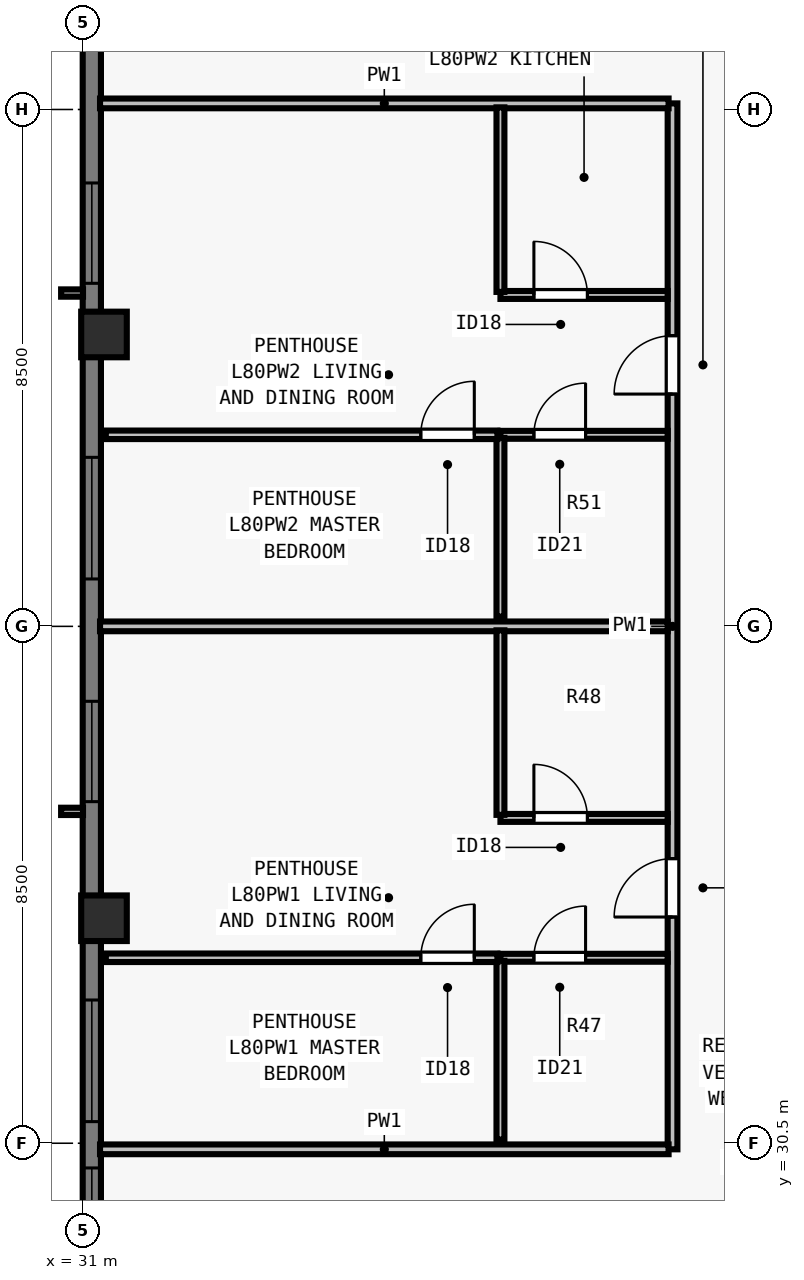
"""IFC4 building model, lengths in metres.
Left out: names, types, materials, properties, quantities, classifications, styles, units other than length and angle.
Written with IfcOpenShell. Run it as: python <this file> out.ifc"""

import sys

from ifc_helpers import new_model, si_unit, direction, frame, frame_2d, origin, origin_2d, place, context, subcontext, project, spatial, rectangle, extrude, element, fill, save


model = new_model("IFC4")
c1 = context("Model", 3, precision=1e-05, world=origin(), true_north=direction((0.0, 1.0)))
c2 = subcontext(c1, "Body", "Model", "MODEL_VIEW")
j1 = project(units=[si_unit("LENGTHUNIT", "METRE"), si_unit("PLANEANGLEUNIT", "RADIAN")], contexts=[c1])
p1 = place(None, origin())
s1 = spatial("IfcSite", under=j1, at=p1, CompositionType="ELEMENT")
p2 = place(p1, origin())
s2 = spatial("IfcBuilding", under=s1, at=p2, CompositionType="ELEMENT")
p3 = place(p2, frame((0.0, 0.0, 291.0)))
s3 = spatial("IfcBuildingStorey", under=s2, at=p3, CompositionType="ELEMENT", Elevation=291.0)
for number, where, z_axis, x_axis in (
    (1, (31.35, 43.8, 0.0), (0.0, 0.0, 1.0), (0.0, 1.0, 0.0)),
    (2, (31.35, 34.2, 0.0), (0.0, 0.0, 1.0), (0.0, 1.0, 0.0)),
):
    element("IfcColumn", number, at=place(p3, frame(where, z_axis=z_axis, x_axis=x_axis)), inside=s3, PredefinedType="COLUMN", context=c2, shape_type="SweptSolid", body=[
        extrude(rectangle(XDim=0.75, YDim=0.75, at=origin_2d()), origin(), (0.0, 0.0, 1.0), 3.5),
    ])
p4 = place(p3, frame((31.15, 23.5, 0.0), z_axis=(0.0, 0.0, 1.0), x_axis=(0.0, 1.0, 0.0)))
e3 = element("IfcWall", 3, at=p4, inside=s3, PredefinedType="SOLIDWALL", context=c2, shape_type="SweptSolid", body=[
    extrude(rectangle(XDim=30.722, YDim=0.3, at=frame_2d((15.361, 0.0))), origin(), (0.0, 0.0, 1.0), 3.29),
])
p5 = place(p4, frame((4.944, 0.0, 0.8)))
e4 = element("IfcOpeningElement", 4, at=p5, cuts=e3, PredefinedType="OPENING", context=c2, shape_type="SweptSolid", body=[
    extrude(rectangle(XDim=1.65, YDim=1.758, at=frame_2d((0.825, 0.879))), frame((0.0, 0.16, 0.0), z_axis=(0.0, -1.0, 0.0), x_axis=(1.0, 0.0, 0.0)), (0.0, 0.0, 1.0), 0.32),
])
p6 = place(p4, frame((7.355, 0.0, 0.8)))
e5 = element("IfcOpeningElement", 5, at=p6, cuts=e3, PredefinedType="OPENING", context=c2, shape_type="SweptSolid", body=[
    extrude(rectangle(XDim=2.0, YDim=1.758, at=frame_2d((1.0, 0.879))), frame((0.0, 0.16, 0.0), z_axis=(0.0, -1.0, 0.0), x_axis=(1.0, 0.0, 0.0)), (0.0, 0.0, 1.0), 0.32),
])
p7 = place(p4, frame((12.617, 0.0, 0.8)))
e6 = element("IfcOpeningElement", 6, at=p7, cuts=e3, PredefinedType="OPENING", context=c2, shape_type="SweptSolid", body=[
    extrude(rectangle(XDim=1.65, YDim=1.758, at=frame_2d((0.825, 0.879))), frame((0.0, 0.16, 0.0), z_axis=(0.0, -1.0, 0.0), x_axis=(1.0, 0.0, 0.0)), (0.0, 0.0, 1.0), 0.32),
])
p8 = place(p4, frame((16.28, 0.0, 0.8)))
e7 = element("IfcOpeningElement", 7, at=p8, cuts=e3, PredefinedType="OPENING", context=c2, shape_type="SweptSolid", body=[
    extrude(rectangle(XDim=2.0, YDim=1.758, at=frame_2d((1.0, 0.879))), frame((0.0, 0.16, 0.0), z_axis=(0.0, -1.0, 0.0), x_axis=(1.0, 0.0, 0.0)), (0.0, 0.0, 1.0), 0.32),
])
p9 = place(p4, frame((21.142, 0.0, 0.8)))
e8 = element("IfcOpeningElement", 8, at=p9, cuts=e3, PredefinedType="OPENING", context=c2, shape_type="SweptSolid", body=[
    extrude(rectangle(XDim=1.65, YDim=1.758, at=frame_2d((0.825, 0.879))), frame((0.0, 0.16, 0.0), z_axis=(0.0, -1.0, 0.0), x_axis=(1.0, 0.0, 0.0)), (0.0, 0.0, 1.0), 0.32),
])
p10 = place(p4, frame((27.11, 0.0, 0.8)))
e9 = element("IfcOpeningElement", 9, at=p10, cuts=e3, PredefinedType="OPENING", context=c2, shape_type="SweptSolid", body=[
    extrude(rectangle(XDim=0.9, YDim=1.75, at=frame_2d((0.45, 0.875))), frame((0.0, 0.16, 0.0), z_axis=(0.0, -1.0, 0.0), x_axis=(1.0, 0.0, 0.0)), (0.0, 0.0, 1.0), 0.32),
])
p11 = place(p3, frame((40.7, 30.4, 0.0), z_axis=(0.0, 0.0, 1.0), x_axis=(0.0, 1.0, 0.0)))
e10 = element("IfcWall", 10, at=p11, inside=s3, PredefinedType="PARTITIONING", context=c2, shape_type="SweptSolid", body=[
    extrude(rectangle(XDim=17.2, YDim=0.16, at=frame_2d((8.6, 0.0))), origin(), (0.0, 0.0, 1.0), 3.009),
])
p12 = place(p11, frame((3.82, 0.0, 0.0)))
e11 = element("IfcOpeningElement", 11, at=p12, cuts=e10, PredefinedType="OPENING", context=c2, shape_type="SweptSolid", body=[
    extrude(rectangle(XDim=0.96, YDim=2.18, at=frame_2d((0.48, 1.09))), frame((0.0, 0.09, 0.0), z_axis=(0.0, -1.0, 0.0), x_axis=(1.0, 0.0, 0.0)), (0.0, 0.0, 1.0), 0.18),
])
p13 = place(p11, frame((12.42, 0.0, 0.0)))
e12 = element("IfcOpeningElement", 12, at=p13, cuts=e10, PredefinedType="OPENING", context=c2, shape_type="SweptSolid", body=[
    extrude(rectangle(XDim=0.96, YDim=2.18, at=frame_2d((0.48, 1.09))), frame((0.0, 0.09, 0.0), z_axis=(0.0, -1.0, 0.0), x_axis=(1.0, 0.0, 0.0)), (0.0, 0.0, 1.0), 0.18),
])
for number, where, z_axis, x_axis in (
    (13, (31.285, 30.4, 0.0), (0.0, 0.0, 1.0), (1.0, 0.0, 0.0)),
    (14, (31.285, 47.6, 0.0), (0.0, 0.0, 1.0), (1.0, 0.0, 0.0)),
):
    element("IfcWall", number, at=place(p3, frame(where, z_axis=z_axis, x_axis=x_axis)), inside=s3, PredefinedType="PARTITIONING", context=c2, shape_type="SweptSolid", body=[
        extrude(rectangle(XDim=9.35, YDim=0.16, at=frame_2d((4.675, 0.0))), origin(), (0.0, 0.0, 1.0), 3.29),
    ])
p14 = place(p3, frame((31.285, 39.0, 0.0), z_axis=(0.0, 0.0, 1.0), x_axis=(1.0, 0.0, 0.0)))
e15 = element("IfcWall", 15, at=p14, inside=s3, PredefinedType="PARTITIONING", context=c2, shape_type="SweptSolid", body=[
    extrude(rectangle(XDim=9.335, YDim=0.16, at=frame_2d((4.667, 0.0))), origin(), (0.0, 0.0, 1.0), 3.29),
])
p15 = place(p3, frame((37.87, 33.55, 0.0), z_axis=(0.0, 0.0, 1.0), x_axis=(1.0, 0.0, 0.0)))
e16 = element("IfcWall", 16, at=p15, inside=s3, PredefinedType="PLUMBINGWALL", context=c2, shape_type="SweptSolid", body=[
    extrude(rectangle(XDim=2.75, YDim=0.13, at=frame_2d((1.375, 0.0))), origin(), (0.0, 0.0, 1.0), 3.29),
])
p16 = place(p15, frame((0.55, 0.0, 0.0)))
e17 = element("IfcOpeningElement", 17, at=p16, cuts=e16, PredefinedType="OPENING", context=c2, shape_type="SweptSolid", body=[
    extrude(rectangle(XDim=0.85, YDim=2.08, at=frame_2d((0.425, 1.04))), frame((0.0, 0.075, 0.0), z_axis=(0.0, -1.0, 0.0), x_axis=(1.0, 0.0, 0.0)), (0.0, 0.0, 1.0), 0.15),
])
p17 = place(p3, frame((37.87, 30.56, 0.0), z_axis=(0.0, 0.0, 1.0), x_axis=(0.0, 1.0, 0.0)))
e18 = element("IfcWall", 18, at=p17, inside=s3, PredefinedType="PLUMBINGWALL", context=c2, shape_type="SweptSolid", body=[
    extrude(rectangle(XDim=2.94, YDim=0.13, at=frame_2d((1.47, 0.0))), origin(), (0.0, 0.0, 1.0), 3.29),
])
p18 = place(p3, frame((37.87, 35.85, 0.0), z_axis=(0.0, 0.0, 1.0), x_axis=(1.0, 0.0, 0.0)))
e19 = element("IfcWall", 19, at=p18, inside=s3, PredefinedType="PLUMBINGWALL", context=c2, shape_type="SweptSolid", body=[
    extrude(rectangle(XDim=2.75, YDim=0.13, at=frame_2d((1.375, 0.0))), origin(), (0.0, 0.0, 1.0), 3.29),
])
p19 = place(p18, frame((0.55, 0.0, 0.0)))
e20 = element("IfcOpeningElement", 20, at=p19, cuts=e19, PredefinedType="OPENING", context=c2, shape_type="SweptSolid", body=[
    extrude(rectangle(XDim=0.88, YDim=2.1, at=frame_2d((0.44, 1.05))), frame((0.0, 0.075, 0.0), z_axis=(0.0, -1.0, 0.0), x_axis=(1.0, 0.0, 0.0)), (0.0, 0.0, 1.0), 0.15),
])
p20 = place(p3, frame((37.87, 35.9, 0.0), z_axis=(0.0, 0.0, 1.0), x_axis=(0.0, 1.0, 0.0)))
e21 = element("IfcWall", 21, at=p20, inside=s3, PredefinedType="PLUMBINGWALL", context=c2, shape_type="SweptSolid", body=[
    extrude(rectangle(XDim=3.035, YDim=0.13, at=frame_2d((1.518, 0.0))), origin(), (0.0, 0.0, 1.0), 3.29),
])
p21 = place(p3, frame((31.38, 33.55, 0.0), z_axis=(0.0, 0.0, 1.0), x_axis=(1.0, 0.0, 0.0)))
e22 = element("IfcWall", 22, at=p21, inside=s3, PredefinedType="PARTITIONING", context=c2, shape_type="SweptSolid", body=[
    extrude(rectangle(XDim=6.44, YDim=0.14, at=frame_2d((3.22, 0.0))), origin(), (0.0, 0.0, 1.0), 2.653),
])
p22 = place(p21, frame((5.18, 0.0, 0.0)))
e23 = element("IfcOpeningElement", 23, at=p22, cuts=e22, PredefinedType="OPENING", context=c2, shape_type="SweptSolid", body=[
    extrude(rectangle(XDim=0.88, YDim=2.1, at=frame_2d((0.44, 1.05))), frame((0.0, 0.08, 0.0), z_axis=(0.0, -1.0, 0.0), x_axis=(1.0, 0.0, 0.0)), (0.0, 0.0, 1.0), 0.16),
])
p23 = place(p3, frame((37.87, 42.15, 0.0), z_axis=(0.0, 0.0, 1.0), x_axis=(1.0, 0.0, 0.0)))
e24 = element("IfcWall", 24, at=p23, inside=s3, PredefinedType="PLUMBINGWALL", context=c2, shape_type="SweptSolid", body=[
    extrude(rectangle(XDim=2.75, YDim=0.13, at=frame_2d((1.375, 0.0))), origin(), (0.0, 0.0, 1.0), 3.29),
])
p24 = place(p23, frame((0.55, 0.0, 0.0)))
e25 = element("IfcOpeningElement", 25, at=p24, cuts=e24, PredefinedType="OPENING", context=c2, shape_type="SweptSolid", body=[
    extrude(rectangle(XDim=0.85, YDim=2.08, at=frame_2d((0.425, 1.04))), frame((0.0, 0.075, 0.0), z_axis=(0.0, -1.0, 0.0), x_axis=(1.0, 0.0, 0.0)), (0.0, 0.0, 1.0), 0.15),
])
p25 = place(p3, frame((37.87, 39.16, 0.0), z_axis=(0.0, 0.0, 1.0), x_axis=(0.0, 1.0, 0.0)))
e26 = element("IfcWall", 26, at=p25, inside=s3, PredefinedType="PLUMBINGWALL", context=c2, shape_type="SweptSolid", body=[
    extrude(rectangle(XDim=2.94, YDim=0.13, at=frame_2d((1.47, 0.0))), origin(), (0.0, 0.0, 1.0), 3.009),
])
p26 = place(p3, frame((37.87, 44.45, 0.0), z_axis=(0.0, 0.0, 1.0), x_axis=(1.0, 0.0, 0.0)))
e27 = element("IfcWall", 27, at=p26, inside=s3, PredefinedType="PLUMBINGWALL", context=c2, shape_type="SweptSolid", body=[
    extrude(rectangle(XDim=2.75, YDim=0.13, at=frame_2d((1.375, 0.0))), origin(), (0.0, 0.0, 1.0), 3.29),
])
p27 = place(p26, frame((0.55, 0.0, 0.0)))
e28 = element("IfcOpeningElement", 28, at=p27, cuts=e27, PredefinedType="OPENING", context=c2, shape_type="SweptSolid", body=[
    extrude(rectangle(XDim=0.88, YDim=2.1, at=frame_2d((0.44, 1.05))), frame((0.0, 0.075, 0.0), z_axis=(0.0, -1.0, 0.0), x_axis=(1.0, 0.0, 0.0)), (0.0, 0.0, 1.0), 0.15),
])
p28 = place(p3, frame((37.87, 44.5, 0.0), z_axis=(0.0, 0.0, 1.0), x_axis=(0.0, 1.0, 0.0)))
e29 = element("IfcWall", 29, at=p28, inside=s3, PredefinedType="PLUMBINGWALL", context=c2, shape_type="SweptSolid", body=[
    extrude(rectangle(XDim=3.035, YDim=0.13, at=frame_2d((1.518, 0.0))), origin(), (0.0, 0.0, 1.0), 3.29),
])
p29 = place(p3, frame((31.38, 42.15, 0.0), z_axis=(0.0, 0.0, 1.0), x_axis=(1.0, 0.0, 0.0)))
e30 = element("IfcWall", 30, at=p29, inside=s3, PredefinedType="PARTITIONING", context=c2, shape_type="SweptSolid", body=[
    extrude(rectangle(XDim=6.44, YDim=0.14, at=frame_2d((3.22, 0.0))), origin(), (0.0, 0.0, 1.0), 3.29),
])
p30 = place(p29, frame((5.18, 0.0, 0.0)))
e31 = element("IfcOpeningElement", 31, at=p30, cuts=e30, PredefinedType="OPENING", context=c2, shape_type="SweptSolid", body=[
    extrude(rectangle(XDim=0.88, YDim=2.1, at=frame_2d((0.44, 1.05))), frame((0.0, 0.08, 0.0), z_axis=(0.0, -1.0, 0.0), x_axis=(1.0, 0.0, 0.0)), (0.0, 0.0, 1.0), 0.16),
])
p31 = place(p5, origin())
e32 = element("IfcWindow", 32, at=p31, inside=s3, PartitioningType="SINGLE_PANEL", PredefinedType="WINDOW", context=c2, shape_type="SweptSolid", body=[
    extrude(rectangle(XDim=1.65, YDim=1.758, at=frame_2d((0.825, 0.879))), frame((0.0, -0.05, 0.0), z_axis=(0.0, -1.0, 0.0), x_axis=(1.0, 0.0, 0.0)), (0.0, 0.0, 1.0), 0.06),
])
fill(e4, e32)
p32 = place(p6, origin())
e33 = element("IfcWindow", 33, at=p32, inside=s3, PartitioningType="SINGLE_PANEL", PredefinedType="WINDOW", context=c2, shape_type="SweptSolid", body=[
    extrude(rectangle(XDim=2.0, YDim=1.758, at=frame_2d((1.0, 0.879))), frame((0.0, -0.05, 0.0), z_axis=(0.0, -1.0, 0.0), x_axis=(1.0, 0.0, 0.0)), (0.0, 0.0, 1.0), 0.06),
])
fill(e5, e33)
p33 = place(p7, origin())
e34 = element("IfcWindow", 34, at=p33, inside=s3, PartitioningType="SINGLE_PANEL", PredefinedType="WINDOW", context=c2, shape_type="SweptSolid", body=[
    extrude(rectangle(XDim=1.65, YDim=1.758, at=frame_2d((0.825, 0.879))), frame((0.0, -0.05, 0.0), z_axis=(0.0, -1.0, 0.0), x_axis=(1.0, 0.0, 0.0)), (0.0, 0.0, 1.0), 0.06),
])
fill(e6, e34)
p34 = place(p8, origin())
e35 = element("IfcWindow", 35, at=p34, inside=s3, PartitioningType="SINGLE_PANEL", PredefinedType="WINDOW", context=c2, shape_type="SweptSolid", body=[
    extrude(rectangle(XDim=2.0, YDim=1.758, at=frame_2d((1.0, 0.879))), frame((0.0, -0.05, 0.0), z_axis=(0.0, -1.0, 0.0), x_axis=(1.0, 0.0, 0.0)), (0.0, 0.0, 1.0), 0.06),
])
fill(e7, e35)
p35 = place(p9, origin())
e36 = element("IfcWindow", 36, at=p35, inside=s3, PartitioningType="SINGLE_PANEL", PredefinedType="WINDOW", context=c2, shape_type="SweptSolid", body=[
    extrude(rectangle(XDim=1.65, YDim=1.758, at=frame_2d((0.825, 0.879))), frame((0.0, -0.05, 0.0), z_axis=(0.0, -1.0, 0.0), x_axis=(1.0, 0.0, 0.0)), (0.0, 0.0, 1.0), 0.06),
])
fill(e8, e36)
p36 = place(p16, origin())
e37 = element("IfcDoor", 37, at=p36, inside=s3, OperationType="SINGLE_SWING_RIGHT", PredefinedType="DOOR", context=c2, shape_type="SweptSolid", body=[
    extrude(rectangle(XDim=0.85, YDim=2.08, at=frame_2d((0.425, 1.04))), frame((0.0, 0.025, 0.0), z_axis=(0.0, -1.0, 0.0), x_axis=(1.0, 0.0, 0.0)), (0.0, 0.0, 1.0), 0.05),
])
fill(e17, e37)
p37 = place(p19, origin())
e38 = element("IfcDoor", 38, at=p37, inside=s3, OperationType="SINGLE_SWING_LEFT", PredefinedType="DOOR", context=c2, shape_type="SweptSolid", body=[
    extrude(rectangle(XDim=0.88, YDim=2.1, at=frame_2d((0.44, 1.05))), frame((0.0, 0.025, 0.0), z_axis=(0.0, -1.0, 0.0), x_axis=(1.0, 0.0, 0.0)), (0.0, 0.0, 1.0), 0.05),
])
fill(e20, e38)
p38 = place(p22, origin())
e39 = element("IfcDoor", 39, at=p38, inside=s3, OperationType="SINGLE_SWING_RIGHT", PredefinedType="DOOR", context=c2, shape_type="SweptSolid", body=[
    extrude(rectangle(XDim=0.88, YDim=2.1, at=frame_2d((0.44, 1.05))), frame((0.0, 0.025, 0.0), z_axis=(0.0, -1.0, 0.0), x_axis=(1.0, 0.0, 0.0)), (0.0, 0.0, 1.0), 0.05),
])
fill(e23, e39)
p39 = place(p12, origin())
e40 = element("IfcDoor", 40, at=p39, inside=s3, OperationType="SINGLE_SWING_LEFT", PredefinedType="DOOR", context=c2, shape_type="SweptSolid", body=[
    extrude(rectangle(XDim=0.96, YDim=2.18, at=frame_2d((0.48, 1.09))), frame((0.0, 0.025, 0.0), z_axis=(0.0, -1.0, 0.0), x_axis=(1.0, 0.0, 0.0)), (0.0, 0.0, 1.0), 0.05),
])
fill(e11, e40)
p40 = place(p24, origin())
e41 = element("IfcDoor", 41, at=p40, inside=s3, OperationType="SINGLE_SWING_RIGHT", PredefinedType="DOOR", context=c2, shape_type="SweptSolid", body=[
    extrude(rectangle(XDim=0.85, YDim=2.08, at=frame_2d((0.425, 1.04))), frame((0.0, 0.025, 0.0), z_axis=(0.0, -1.0, 0.0), x_axis=(1.0, 0.0, 0.0)), (0.0, 0.0, 1.0), 0.05),
])
fill(e25, e41)
p41 = place(p27, origin())
e42 = element("IfcDoor", 42, at=p41, inside=s3, OperationType="SINGLE_SWING_LEFT", PredefinedType="DOOR", context=c2, shape_type="SweptSolid", body=[
    extrude(rectangle(XDim=0.88, YDim=2.1, at=frame_2d((0.44, 1.05))), frame((0.0, 0.025, 0.0), z_axis=(0.0, -1.0, 0.0), x_axis=(1.0, 0.0, 0.0)), (0.0, 0.0, 1.0), 0.05),
])
fill(e28, e42)
p42 = place(p30, origin())
e43 = element("IfcDoor", 43, at=p42, inside=s3, OperationType="SINGLE_SWING_RIGHT", PredefinedType="DOOR", context=c2, shape_type="SweptSolid", body=[
    extrude(rectangle(XDim=0.88, YDim=2.1, at=frame_2d((0.44, 1.05))), frame((0.0, 0.025, 0.0), z_axis=(0.0, -1.0, 0.0), x_axis=(1.0, 0.0, 0.0)), (0.0, 0.0, 1.0), 0.05),
])
fill(e31, e43)
p43 = place(p13, origin())
e44 = element("IfcDoor", 44, at=p43, inside=s3, OperationType="SINGLE_SWING_LEFT", PredefinedType="DOOR", context=c2, shape_type="SweptSolid", body=[
    extrude(rectangle(XDim=0.96, YDim=2.18, at=frame_2d((0.48, 1.09))), frame((0.0, 0.025, 0.0), z_axis=(0.0, -1.0, 0.0), x_axis=(1.0, 0.0, 0.0)), (0.0, 0.0, 1.0), 0.05),
])
fill(e12, e44)
save(model, sys.argv[1])
